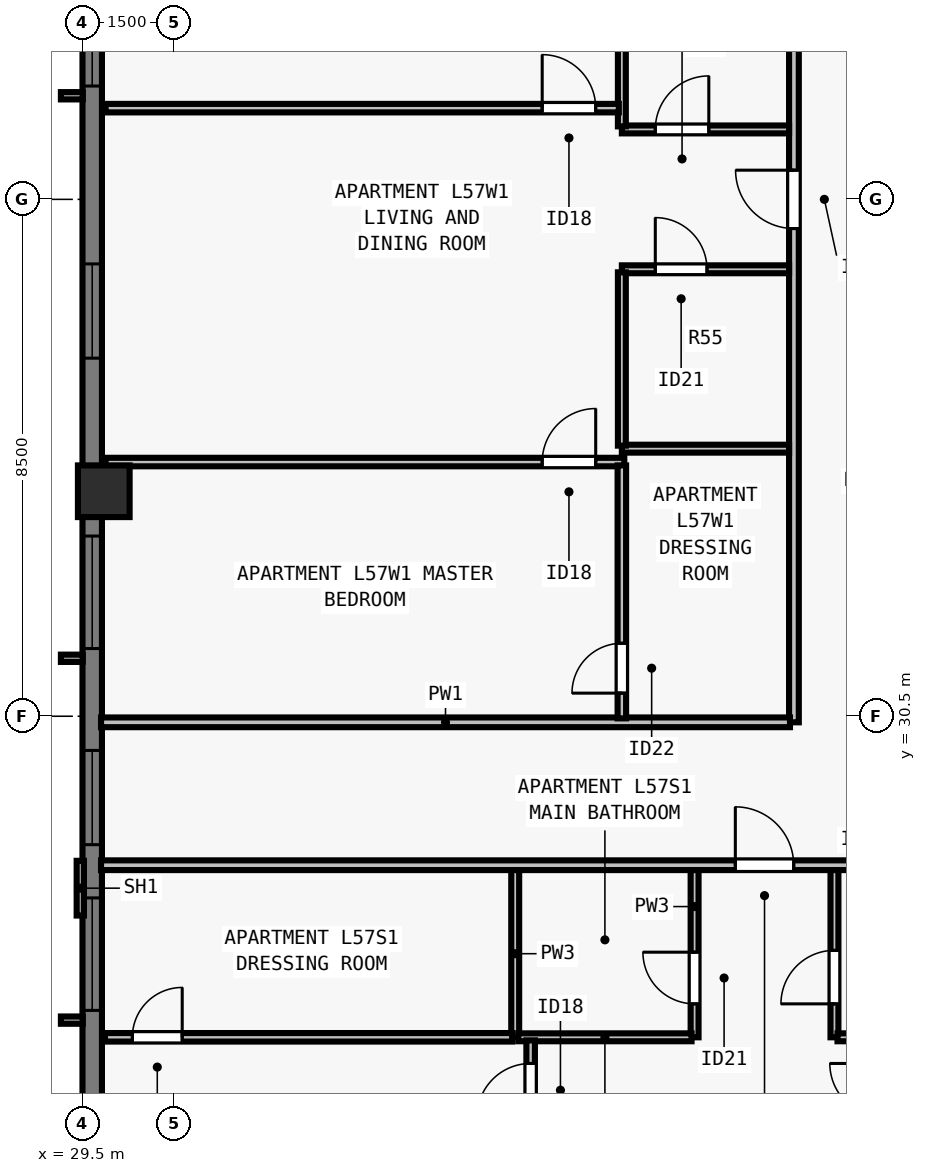
"""IFC4 building model, lengths in metres.
Left out: names, types, materials, properties, quantities, classifications, styles, units other than length and angle.
Written with IfcOpenShell. Run it as: python <this file> out.ifc"""

import sys

from ifc_helpers import new_model, si_unit, direction, frame, frame_2d, origin, origin_2d, place, context, subcontext, project, spatial, rectangle, extrude, element, fill, save


model = new_model("IFC4")
c1 = context("Model", 3, precision=1e-05, world=origin(), true_north=direction((0.0, 1.0)))
c2 = subcontext(c1, "Body", "Model", "MODEL_VIEW")
j1 = project(units=[si_unit("LENGTHUNIT", "METRE"), si_unit("PLANEANGLEUNIT", "RADIAN")], contexts=[c1])
p1 = place(None, origin())
s1 = spatial("IfcSite", under=j1, at=p1, CompositionType="ELEMENT")
p2 = place(p1, origin())
s2 = spatial("IfcBuilding", under=s1, at=p2, CompositionType="ELEMENT")
p3 = place(p2, frame((0.0, 0.0, 209.5)))
s3 = spatial("IfcBuildingStorey", under=s2, at=p3, CompositionType="ELEMENT", Elevation=209.5)
p4 = place(p3, frame((29.85, 34.2, 0.0), z_axis=(0.0, 0.0, 1.0), x_axis=(0.0, 1.0, 0.0)))
e1 = element("IfcColumn", 1, at=p4, inside=s3, PredefinedType="COLUMN", context=c2, shape_type="SweptSolid", body=[
    extrude(rectangle(XDim=0.85, YDim=0.85, at=origin_2d()), origin(), (0.0, 0.0, 1.0), 3.5),
])
p5 = place(p3, frame((29.66, 21.5, 0.0), z_axis=(0.0, 0.0, 1.0), x_axis=(0.0, 1.0, 0.0)))
e2 = element("IfcWall", 2, at=p5, inside=s3, PredefinedType="SOLIDWALL", context=c2, shape_type="SweptSolid", body=[
    extrude(rectangle(XDim=34.702, YDim=0.32, at=frame_2d((17.351, 0.0))), origin(), (0.0, 0.0, 1.0), 3.29),
])
p6 = place(p5, frame((4.163, 0.0, 0.8)))
e3 = element("IfcOpeningElement", 3, at=p6, cuts=e2, PredefinedType="OPENING", context=c2, shape_type="SweptSolid", body=[
    extrude(rectangle(XDim=1.85, YDim=1.678, at=frame_2d((0.925, 0.839))), frame((0.0, 0.17, 0.0), z_axis=(0.0, -1.0, 0.0), x_axis=(1.0, 0.0, 0.0)), (0.0, 0.0, 1.0), 0.34),
])
p7 = place(p5, frame((6.888, 0.0, 0.8)))
e4 = element("IfcOpeningElement", 4, at=p7, cuts=e2, PredefinedType="OPENING", context=c2, shape_type="SweptSolid", body=[
    extrude(rectangle(XDim=1.55, YDim=1.678, at=frame_2d((0.775, 0.839))), frame((0.0, 0.17, 0.0), z_axis=(0.0, -1.0, 0.0), x_axis=(1.0, 0.0, 0.0)), (0.0, 0.0, 1.0), 0.34),
])
p8 = place(p5, frame((10.113, 0.0, 0.8)))
e5 = element("IfcOpeningElement", 5, at=p8, cuts=e2, PredefinedType="OPENING", context=c2, shape_type="SweptSolid", body=[
    extrude(rectangle(XDim=1.85, YDim=1.678, at=frame_2d((0.925, 0.839))), frame((0.0, 0.17, 0.0), z_axis=(0.0, -1.0, 0.0), x_axis=(1.0, 0.0, 0.0)), (0.0, 0.0, 1.0), 0.34),
])
p9 = place(p5, frame((14.888, 0.0, 0.8)))
e6 = element("IfcOpeningElement", 6, at=p9, cuts=e2, PredefinedType="OPENING", context=c2, shape_type="SweptSolid", body=[
    extrude(rectangle(XDim=1.55, YDim=1.678, at=frame_2d((0.775, 0.839))), frame((0.0, 0.17, 0.0), z_axis=(0.0, -1.0, 0.0), x_axis=(1.0, 0.0, 0.0)), (0.0, 0.0, 1.0), 0.34),
])
p10 = place(p5, frame((19.364, 0.0, 0.8)))
e7 = element("IfcOpeningElement", 7, at=p10, cuts=e2, PredefinedType="OPENING", context=c2, shape_type="SweptSolid", body=[
    extrude(rectangle(XDim=1.85, YDim=1.678, at=frame_2d((0.925, 0.839))), frame((0.0, 0.17, 0.0), z_axis=(0.0, -1.0, 0.0), x_axis=(1.0, 0.0, 0.0)), (0.0, 0.0, 1.0), 0.34),
])
p11 = place(p5, frame((23.614, 0.0, 0.8)))
e8 = element("IfcOpeningElement", 8, at=p11, cuts=e2, PredefinedType="OPENING", context=c2, shape_type="SweptSolid", body=[
    extrude(rectangle(XDim=1.85, YDim=1.678, at=frame_2d((0.925, 0.839))), frame((0.0, 0.17, 0.0), z_axis=(0.0, -1.0, 0.0), x_axis=(1.0, 0.0, 0.0)), (0.0, 0.0, 1.0), 0.34),
])
p12 = place(p5, frame((28.839, 0.0, 0.8)))
e9 = element("IfcOpeningElement", 9, at=p12, cuts=e2, PredefinedType="OPENING", context=c2, shape_type="SweptSolid", body=[
    extrude(rectangle(XDim=1.55, YDim=1.678, at=frame_2d((0.775, 0.839))), frame((0.0, 0.17, 0.0), z_axis=(0.0, -1.0, 0.0), x_axis=(1.0, 0.0, 0.0)), (0.0, 0.0, 1.0), 0.34),
])
p13 = place(p3, frame((29.805, 28.05, 0.0), z_axis=(0.0, 0.0, 1.0), x_axis=(1.0, 0.0, 0.0)))
e10 = element("IfcWall", 10, at=p13, inside=s3, PredefinedType="PARTITIONING", context=c2, shape_type="SweptSolid", body=[
    extrude(rectangle(XDim=44.39, YDim=0.16, at=frame_2d((22.195, 0.0))), origin(), (0.0, 0.0, 1.0), 2.958),
])
p14 = place(p13, frame((10.431, 0.0, 0.0)))
e11 = element("IfcOpeningElement", 11, at=p14, cuts=e10, PredefinedType="OPENING", context=c2, shape_type="SweptSolid", body=[
    extrude(rectangle(XDim=0.96, YDim=2.18, at=frame_2d((0.48, 1.09))), frame((0.0, 0.09, 0.0), z_axis=(0.0, -1.0, 0.0), x_axis=(1.0, 0.0, 0.0)), (0.0, 0.0, 1.0), 0.18),
])
p15 = place(p13, frame((32.511, 0.0, 0.0)))
e12 = element("IfcOpeningElement", 12, at=p15, cuts=e10, PredefinedType="OPENING", context=c2, shape_type="SweptSolid", body=[
    extrude(rectangle(XDim=0.96, YDim=2.18, at=frame_2d((0.48, 1.09))), frame((0.0, 0.09, 0.0), z_axis=(0.0, -1.0, 0.0), x_axis=(1.0, 0.0, 0.0)), (0.0, 0.0, 1.0), 0.18),
])
p16 = place(p3, frame((41.2, 30.4, 0.0), z_axis=(0.0, 0.0, 1.0), x_axis=(0.0, 1.0, 0.0)))
e13 = element("IfcWall", 13, at=p16, inside=s3, PredefinedType="PARTITIONING", context=c2, shape_type="SweptSolid", body=[
    extrude(rectangle(XDim=17.2, YDim=0.16, at=frame_2d((8.6, 0.0))), origin(), (0.0, 0.0, 1.0), 3.29),
])
p17 = place(p16, frame((8.12, 0.0, 0.0)))
e14 = element("IfcOpeningElement", 14, at=p17, cuts=e13, PredefinedType="OPENING", context=c2, shape_type="SweptSolid", body=[
    extrude(rectangle(XDim=0.96, YDim=2.18, at=frame_2d((0.48, 1.09))), frame((0.0, 0.09, 0.0), z_axis=(0.0, -1.0, 0.0), x_axis=(1.0, 0.0, 0.0)), (0.0, 0.0, 1.0), 0.18),
])
p18 = place(p3, frame((29.805, 30.4, 0.0), z_axis=(0.0, 0.0, 1.0), x_axis=(1.0, 0.0, 0.0)))
e15 = element("IfcWall", 15, at=p18, inside=s3, PredefinedType="PARTITIONING", context=c2, shape_type="SweptSolid", body=[
    extrude(rectangle(XDim=11.33, YDim=0.16, at=frame_2d((5.665, 0.0))), origin(), (0.0, 0.0, 1.0), 3.29),
])
p19 = place(p3, frame((36.616, 25.22, 0.0), z_axis=(0.0, 0.0, 1.0), x_axis=(0.0, 1.0, 0.0)))
e16 = element("IfcWall", 16, at=p19, inside=s3, PredefinedType="PLUMBINGWALL", context=c2, shape_type="SweptSolid", body=[
    extrude(rectangle(XDim=2.75, YDim=0.13, at=frame_2d((1.375, 0.0))), origin(), (0.0, 0.0, 1.0), 3.29),
])
p20 = place(p3, frame((39.566, 25.22, 0.0), z_axis=(0.0, 0.0, 1.0), x_axis=(0.0, 1.0, 0.0)))
e17 = element("IfcWall", 17, at=p20, inside=s3, PredefinedType="PLUMBINGWALL", context=c2, shape_type="SweptSolid", body=[
    extrude(rectangle(XDim=2.75, YDim=0.13, at=frame_2d((1.375, 0.0))), origin(), (0.0, 0.0, 1.0), 3.29),
])
p21 = place(p20, frame((0.55, 0.0, 0.0)))
e18 = element("IfcOpeningElement", 18, at=p21, cuts=e17, PredefinedType="OPENING", context=c2, shape_type="SweptSolid", body=[
    extrude(rectangle(XDim=0.85, YDim=2.08, at=frame_2d((0.425, 1.04))), frame((0.0, 0.075, 0.0), z_axis=(0.0, -1.0, 0.0), x_axis=(1.0, 0.0, 0.0)), (0.0, 0.0, 1.0), 0.15),
])
p22 = place(p3, frame((36.666, 25.22, 0.0), z_axis=(0.0, 0.0, 1.0), x_axis=(1.0, 0.0, 0.0)))
e19 = element("IfcWall", 19, at=p22, inside=s3, PredefinedType="PLUMBINGWALL", context=c2, shape_type="SweptSolid", body=[
    extrude(rectangle(XDim=2.85, YDim=0.13, at=frame_2d((1.425, 0.0))), origin(), (0.0, 0.0, 1.0), 3.29),
])
p23 = place(p3, frame((41.866, 25.22, 0.0), z_axis=(0.0, 0.0, 1.0), x_axis=(0.0, 1.0, 0.0)))
e20 = element("IfcWall", 20, at=p23, inside=s3, PredefinedType="PLUMBINGWALL", context=c2, shape_type="SweptSolid", body=[
    extrude(rectangle(XDim=2.75, YDim=0.13, at=frame_2d((1.375, 0.0))), origin(), (0.0, 0.0, 1.0), 2.573),
])
p24 = place(p23, frame((0.55, 0.0, 0.0)))
e21 = element("IfcOpeningElement", 21, at=p24, cuts=e20, PredefinedType="OPENING", context=c2, shape_type="SweptSolid", body=[
    extrude(rectangle(XDim=0.88, YDim=2.1, at=frame_2d((0.44, 1.05))), frame((0.0, 0.075, 0.0), z_axis=(0.0, -1.0, 0.0), x_axis=(1.0, 0.0, 0.0)), (0.0, 0.0, 1.0), 0.15),
])
p25 = place(p3, frame((41.916, 25.22, 0.0), z_axis=(0.0, 0.0, 1.0), x_axis=(1.0, 0.0, 0.0)))
e22 = element("IfcWall", 22, at=p25, inside=s3, PredefinedType="PLUMBINGWALL", context=c2, shape_type="SweptSolid", body=[
    extrude(rectangle(XDim=3.15, YDim=0.13, at=frame_2d((1.575, 0.0))), origin(), (0.0, 0.0, 1.0), 3.29),
])
p26 = place(p3, frame((36.87, 16.88, 0.0), z_axis=(0.0, 0.0, 1.0), x_axis=(0.0, 1.0, 0.0)))
e23 = element("IfcWall", 23, at=p26, inside=s3, PredefinedType="PARTITIONING", context=c2, shape_type="SweptSolid", body=[
    extrude(rectangle(XDim=8.29, YDim=0.14, at=frame_2d((4.145, 0.0))), origin(), (0.0, 0.0, 1.0), 2.573),
])
p27 = place(p26, frame((7.03, 0.0, 0.0)))
e24 = element("IfcOpeningElement", 24, at=p27, cuts=e23, PredefinedType="OPENING", context=c2, shape_type="SweptSolid", body=[
    extrude(rectangle(XDim=0.88, YDim=2.1, at=frame_2d((0.44, 1.05))), frame((0.0, 0.08, 0.0), z_axis=(0.0, -1.0, 0.0), x_axis=(1.0, 0.0, 0.0)), (0.0, 0.0, 1.0), 0.16),
])
p28 = place(p3, frame((29.87, 25.22, 0.0), z_axis=(0.0, 0.0, 1.0), x_axis=(1.0, 0.0, 0.0)))
e25 = element("IfcWall", 25, at=p28, inside=s3, PredefinedType="PARTITIONING", context=c2, shape_type="SweptSolid", body=[
    extrude(rectangle(XDim=6.696, YDim=0.14, at=frame_2d((3.348, 0.0))), origin(), (0.0, 0.0, 1.0), 2.958),
])
p29 = place(p28, frame((0.45, 0.0, 0.0)))
e26 = element("IfcOpeningElement", 26, at=p29, cuts=e25, PredefinedType="OPENING", context=c2, shape_type="SweptSolid", body=[
    extrude(rectangle(XDim=0.82, YDim=2.1, at=frame_2d((0.41, 1.05))), frame((0.0, 0.08, 0.0), z_axis=(0.0, -1.0, 0.0), x_axis=(1.0, 0.0, 0.0)), (0.0, 0.0, 1.0), 0.16),
])
p30 = place(p3, frame((38.37, 34.9, 0.0), z_axis=(0.0, 0.0, 1.0), x_axis=(1.0, 0.0, 0.0)))
e27 = element("IfcWall", 27, at=p30, inside=s3, PredefinedType="PLUMBINGWALL", context=c2, shape_type="SweptSolid", body=[
    extrude(rectangle(XDim=2.75, YDim=0.13, at=frame_2d((1.375, 0.0))), origin(), (0.0, 0.0, 1.0), 3.29),
])
p31 = place(p3, frame((38.37, 37.85, 0.0), z_axis=(0.0, 0.0, 1.0), x_axis=(1.0, 0.0, 0.0)))
e28 = element("IfcWall", 28, at=p31, inside=s3, PredefinedType="PLUMBINGWALL", context=c2, shape_type="SweptSolid", body=[
    extrude(rectangle(XDim=2.75, YDim=0.13, at=frame_2d((1.375, 0.0))), origin(), (0.0, 0.0, 1.0), 3.29),
])
p32 = place(p31, frame((0.55, 0.0, 0.0)))
e29 = element("IfcOpeningElement", 29, at=p32, cuts=e28, PredefinedType="OPENING", context=c2, shape_type="SweptSolid", body=[
    extrude(rectangle(XDim=0.85, YDim=2.08, at=frame_2d((0.425, 1.04))), frame((0.0, 0.075, 0.0), z_axis=(0.0, -1.0, 0.0), x_axis=(1.0, 0.0, 0.0)), (0.0, 0.0, 1.0), 0.15),
])
p33 = place(p3, frame((38.37, 34.95, 0.0), z_axis=(0.0, 0.0, 1.0), x_axis=(0.0, 1.0, 0.0)))
e30 = element("IfcWall", 30, at=p33, inside=s3, PredefinedType="PLUMBINGWALL", context=c2, shape_type="SweptSolid", body=[
    extrude(rectangle(XDim=2.85, YDim=0.13, at=frame_2d((1.425, 0.0))), origin(), (0.0, 0.0, 1.0), 3.29),
])
p34 = place(p3, frame((38.37, 40.15, 0.0), z_axis=(0.0, 0.0, 1.0), x_axis=(1.0, 0.0, 0.0)))
e31 = element("IfcWall", 31, at=p34, inside=s3, PredefinedType="PLUMBINGWALL", context=c2, shape_type="SweptSolid", body=[
    extrude(rectangle(XDim=2.75, YDim=0.13, at=frame_2d((1.375, 0.0))), origin(), (0.0, 0.0, 1.0), 3.29),
])
p35 = place(p34, frame((0.55, 0.0, 0.0)))
e32 = element("IfcOpeningElement", 32, at=p35, cuts=e31, PredefinedType="OPENING", context=c2, shape_type="SweptSolid", body=[
    extrude(rectangle(XDim=0.88, YDim=2.1, at=frame_2d((0.44, 1.05))), frame((0.0, 0.075, 0.0), z_axis=(0.0, -1.0, 0.0), x_axis=(1.0, 0.0, 0.0)), (0.0, 0.0, 1.0), 0.15),
])
p36 = place(p3, frame((38.37, 40.2, 0.0), z_axis=(0.0, 0.0, 1.0), x_axis=(0.0, 1.0, 0.0)))
e33 = element("IfcWall", 33, at=p36, inside=s3, PredefinedType="PLUMBINGWALL", context=c2, shape_type="SweptSolid", body=[
    extrude(rectangle(XDim=3.15, YDim=0.13, at=frame_2d((1.575, 0.0))), origin(), (0.0, 0.0, 1.0), 3.29),
])
p37 = place(p3, frame((29.88, 34.68, 0.0), z_axis=(0.0, 0.0, 1.0), x_axis=(1.0, 0.0, 0.0)))
e34 = element("IfcWall", 34, at=p37, inside=s3, PredefinedType="PARTITIONING", context=c2, shape_type="SweptSolid", body=[
    extrude(rectangle(XDim=8.53, YDim=0.14, at=frame_2d((4.265, 0.0))), origin(), (0.0, 0.0, 1.0), 2.958),
])
p38 = place(p37, frame((7.18, 0.0, 0.0)))
e35 = element("IfcOpeningElement", 35, at=p38, cuts=e34, PredefinedType="OPENING", context=c2, shape_type="SweptSolid", body=[
    extrude(rectangle(XDim=0.88, YDim=2.1, at=frame_2d((0.44, 1.05))), frame((0.0, 0.08, 0.0), z_axis=(0.0, -1.0, 0.0), x_axis=(1.0, 0.0, 0.0)), (0.0, 0.0, 1.0), 0.16),
])
p39 = place(p3, frame((38.37, 30.465, 0.0), z_axis=(0.0, 0.0, 1.0), x_axis=(0.0, 1.0, 0.0)))
e36 = element("IfcWall", 36, at=p39, inside=s3, PredefinedType="PARTITIONING", context=c2, shape_type="SweptSolid", body=[
    extrude(rectangle(XDim=4.16, YDim=0.14, at=frame_2d((2.08, 0.0))), origin(), (0.0, 0.0, 1.0), 3.29),
])
p40 = place(p39, frame((0.415, 0.0, 0.0)))
e37 = element("IfcOpeningElement", 37, at=p40, cuts=e36, PredefinedType="OPENING", context=c2, shape_type="SweptSolid", body=[
    extrude(rectangle(XDim=0.82, YDim=2.1, at=frame_2d((0.41, 1.05))), frame((0.0, 0.08, 0.0), z_axis=(0.0, -1.0, 0.0), x_axis=(1.0, 0.0, 0.0)), (0.0, 0.0, 1.0), 0.16),
])
p41 = place(p3, frame((29.88, 40.5, 0.0), z_axis=(0.0, 0.0, 1.0), x_axis=(1.0, 0.0, 0.0)))
e38 = element("IfcWall", 38, at=p41, inside=s3, PredefinedType="PARTITIONING", context=c2, shape_type="SweptSolid", body=[
    extrude(rectangle(XDim=8.44, YDim=0.14, at=frame_2d((4.22, 0.0))), origin(), (0.0, 0.0, 1.0), 2.958),
])
p42 = place(p41, frame((7.18, 0.0, 0.0)))
e39 = element("IfcOpeningElement", 39, at=p42, cuts=e38, PredefinedType="OPENING", context=c2, shape_type="SweptSolid", body=[
    extrude(rectangle(XDim=0.88, YDim=2.1, at=frame_2d((0.44, 1.05))), frame((0.0, 0.08, 0.0), z_axis=(0.0, -1.0, 0.0), x_axis=(1.0, 0.0, 0.0)), (0.0, 0.0, 1.0), 0.16),
])
p43 = place(p6, origin())
e40 = element("IfcWindow", 40, at=p43, inside=s3, PartitioningType="SINGLE_PANEL", PredefinedType="WINDOW", context=c2, shape_type="SweptSolid", body=[
    extrude(rectangle(XDim=1.85, YDim=1.678, at=frame_2d((0.925, 0.839))), frame((0.0, -0.05, 0.0), z_axis=(0.0, -1.0, 0.0), x_axis=(1.0, 0.0, 0.0)), (0.0, 0.0, 1.0), 0.06),
])
fill(e3, e40)
p44 = place(p7, origin())
e41 = element("IfcWindow", 41, at=p44, inside=s3, PartitioningType="SINGLE_PANEL", PredefinedType="WINDOW", context=c2, shape_type="SweptSolid", body=[
    extrude(rectangle(XDim=1.55, YDim=1.678, at=frame_2d((0.775, 0.839))), frame((0.0, -0.05, 0.0), z_axis=(0.0, -1.0, 0.0), x_axis=(1.0, 0.0, 0.0)), (0.0, 0.0, 1.0), 0.06),
])
fill(e4, e41)
p45 = place(p8, origin())
e42 = element("IfcWindow", 42, at=p45, inside=s3, PartitioningType="SINGLE_PANEL", PredefinedType="WINDOW", context=c2, shape_type="SweptSolid", body=[
    extrude(rectangle(XDim=1.85, YDim=1.678, at=frame_2d((0.925, 0.839))), frame((0.0, -0.05, 0.0), z_axis=(0.0, -1.0, 0.0), x_axis=(1.0, 0.0, 0.0)), (0.0, 0.0, 1.0), 0.06),
])
fill(e5, e42)
p46 = place(p9, origin())
e43 = element("IfcWindow", 43, at=p46, inside=s3, PartitioningType="SINGLE_PANEL", PredefinedType="WINDOW", context=c2, shape_type="SweptSolid", body=[
    extrude(rectangle(XDim=1.55, YDim=1.678, at=frame_2d((0.775, 0.839))), frame((0.0, -0.05, 0.0), z_axis=(0.0, -1.0, 0.0), x_axis=(1.0, 0.0, 0.0)), (0.0, 0.0, 1.0), 0.06),
])
fill(e6, e43)
p47 = place(p10, origin())
e44 = element("IfcWindow", 44, at=p47, inside=s3, PartitioningType="SINGLE_PANEL", PredefinedType="WINDOW", context=c2, shape_type="SweptSolid", body=[
    extrude(rectangle(XDim=1.85, YDim=1.678, at=frame_2d((0.925, 0.839))), frame((0.0, -0.05, 0.0), z_axis=(0.0, -1.0, 0.0), x_axis=(1.0, 0.0, 0.0)), (0.0, 0.0, 1.0), 0.06),
])
fill(e7, e44)
p48 = place(p21, origin())
e45 = element("IfcDoor", 45, at=p48, inside=s3, OperationType="SINGLE_SWING_RIGHT", PredefinedType="DOOR", context=c2, shape_type="SweptSolid", body=[
    extrude(rectangle(XDim=0.85, YDim=2.08, at=frame_2d((0.425, 1.04))), frame((0.0, 0.025, 0.0), z_axis=(0.0, -1.0, 0.0), x_axis=(1.0, 0.0, 0.0)), (0.0, 0.0, 1.0), 0.05),
])
fill(e18, e45)
p49 = place(p24, origin())
e46 = element("IfcDoor", 46, at=p49, inside=s3, OperationType="SINGLE_SWING_LEFT", PredefinedType="DOOR", context=c2, shape_type="SweptSolid", body=[
    extrude(rectangle(XDim=0.88, YDim=2.1, at=frame_2d((0.44, 1.05))), frame((0.0, 0.025, 0.0), z_axis=(0.0, -1.0, 0.0), x_axis=(1.0, 0.0, 0.0)), (0.0, 0.0, 1.0), 0.05),
])
fill(e21, e46)
p50 = place(p29, origin())
e47 = element("IfcDoor", 47, at=p50, inside=s3, OperationType="SINGLE_SWING_RIGHT", PredefinedType="DOOR", context=c2, shape_type="SweptSolid", body=[
    extrude(rectangle(XDim=0.82, YDim=2.1, at=frame_2d((0.41, 1.05))), frame((0.0, 0.025, 0.0), z_axis=(0.0, -1.0, 0.0), x_axis=(1.0, 0.0, 0.0)), (0.0, 0.0, 1.0), 0.05),
])
fill(e26, e47)
p51 = place(p27, origin())
e48 = element("IfcDoor", 48, at=p51, inside=s3, OperationType="SINGLE_SWING_LEFT", PredefinedType="DOOR", context=c2, shape_type="SweptSolid", body=[
    extrude(rectangle(XDim=0.88, YDim=2.1, at=frame_2d((0.44, 1.05))), frame((0.0, 0.025, 0.0), z_axis=(0.0, -1.0, 0.0), x_axis=(1.0, 0.0, 0.0)), (0.0, 0.0, 1.0), 0.05),
])
fill(e24, e48)
p52 = place(p14, origin())
e49 = element("IfcDoor", 49, at=p52, inside=s3, OperationType="SINGLE_SWING_LEFT", PredefinedType="DOOR", context=c2, shape_type="SweptSolid", body=[
    extrude(rectangle(XDim=0.96, YDim=2.18, at=frame_2d((0.48, 1.09))), frame((0.0, 0.025, 0.0), z_axis=(0.0, -1.0, 0.0), x_axis=(1.0, 0.0, 0.0)), (0.0, 0.0, 1.0), 0.05),
])
fill(e11, e49)
p53 = place(p32, origin())
e50 = element("IfcDoor", 50, at=p53, inside=s3, OperationType="SINGLE_SWING_LEFT", PredefinedType="DOOR", context=c2, shape_type="SweptSolid", body=[
    extrude(rectangle(XDim=0.85, YDim=2.08, at=frame_2d((0.425, 1.04))), frame((0.0, 0.025, 0.0), z_axis=(0.0, -1.0, 0.0), x_axis=(1.0, 0.0, 0.0)), (0.0, 0.0, 1.0), 0.05),
])
fill(e29, e50)
p54 = place(p35, origin())
e51 = element("IfcDoor", 51, at=p54, inside=s3, OperationType="SINGLE_SWING_RIGHT", PredefinedType="DOOR", context=c2, shape_type="SweptSolid", body=[
    extrude(rectangle(XDim=0.88, YDim=2.1, at=frame_2d((0.44, 1.05))), frame((0.0, 0.025, 0.0), z_axis=(0.0, -1.0, 0.0), x_axis=(1.0, 0.0, 0.0)), (0.0, 0.0, 1.0), 0.05),
])
fill(e32, e51)
p55 = place(p40, origin())
e52 = element("IfcDoor", 52, at=p55, inside=s3, OperationType="SINGLE_SWING_LEFT", PredefinedType="DOOR", context=c2, shape_type="SweptSolid", body=[
    extrude(rectangle(XDim=0.82, YDim=2.1, at=frame_2d((0.41, 1.05))), frame((0.0, 0.025, 0.0), z_axis=(0.0, -1.0, 0.0), x_axis=(1.0, 0.0, 0.0)), (0.0, 0.0, 1.0), 0.05),
])
fill(e37, e52)
p56 = place(p38, origin())
e53 = element("IfcDoor", 53, at=p56, inside=s3, OperationType="SINGLE_SWING_RIGHT", PredefinedType="DOOR", context=c2, shape_type="SweptSolid", body=[
    extrude(rectangle(XDim=0.88, YDim=2.1, at=frame_2d((0.44, 1.05))), frame((0.0, 0.025, 0.0), z_axis=(0.0, -1.0, 0.0), x_axis=(1.0, 0.0, 0.0)), (0.0, 0.0, 1.0), 0.05),
])
fill(e35, e53)
p57 = place(p42, origin())
e54 = element("IfcDoor", 54, at=p57, inside=s3, OperationType="SINGLE_SWING_LEFT", PredefinedType="DOOR", context=c2, shape_type="SweptSolid", body=[
    extrude(rectangle(XDim=0.88, YDim=2.1, at=frame_2d((0.44, 1.05))), frame((0.0, 0.025, 0.0), z_axis=(0.0, -1.0, 0.0), x_axis=(1.0, 0.0, 0.0)), (0.0, 0.0, 1.0), 0.05),
])
fill(e39, e54)
p58 = place(p17, origin())
e55 = element("IfcDoor", 55, at=p58, inside=s3, OperationType="SINGLE_SWING_RIGHT", PredefinedType="DOOR", context=c2, shape_type="SweptSolid", body=[
    extrude(rectangle(XDim=0.96, YDim=2.18, at=frame_2d((0.48, 1.09))), frame((0.0, 0.025, 0.0), z_axis=(0.0, -1.0, 0.0), x_axis=(1.0, 0.0, 0.0)), (0.0, 0.0, 1.0), 0.05),
])
fill(e14, e55)
save(model, sys.argv[1])
